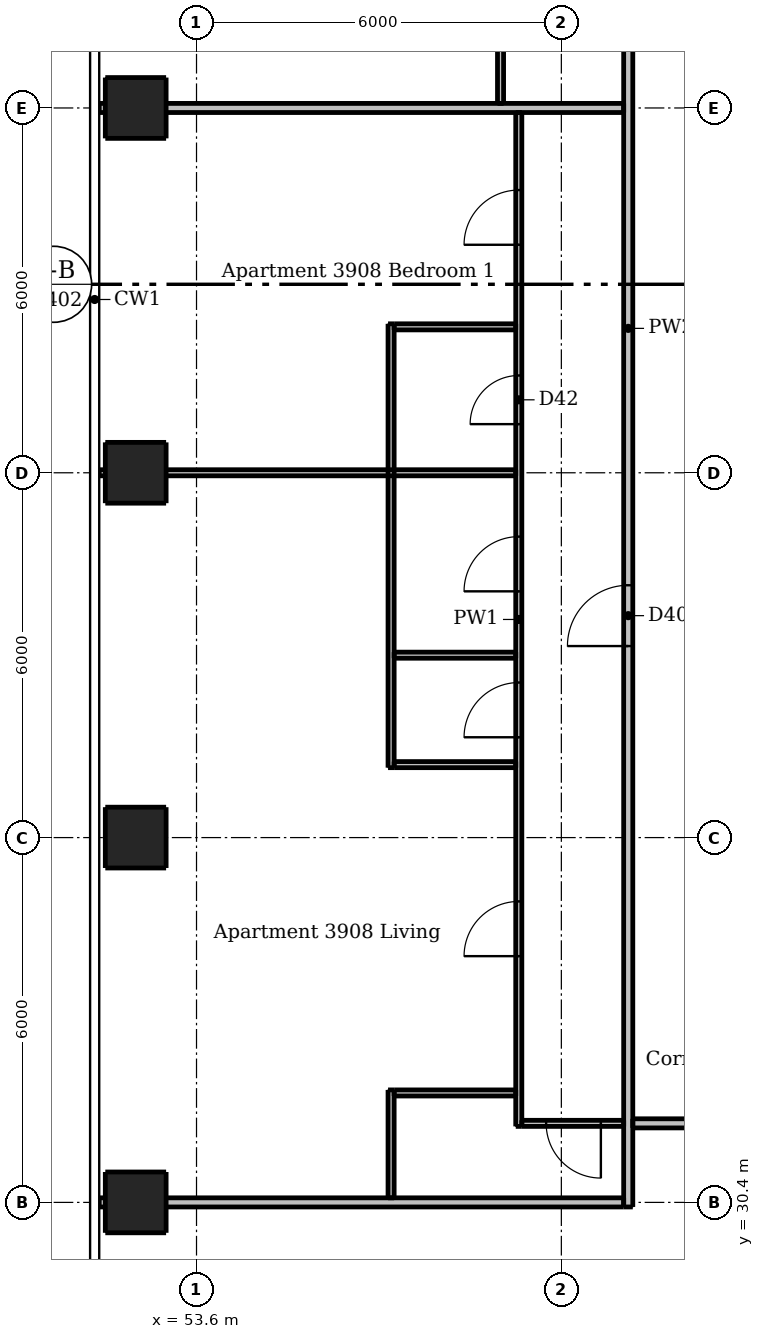
"""IFC4 building model, lengths in metres.
Left out: names, types, materials, properties, quantities, classifications, styles, units other than length and angle.
Written with IfcOpenShell. Run it as: python <this file> out.ifc"""

import sys

from ifc_helpers import new_model, si_unit, direction, frame, frame_2d, origin, origin_2d, place, context, subcontext, project, spatial, rectangle, extrude, element, fill, save


model = new_model("IFC4")
c1 = context("Model", 3, precision=1e-05, world=origin(), true_north=direction((0.0, 1.0)))
c2 = subcontext(c1, "Body", "Model", "MODEL_VIEW")
j1 = project(units=[si_unit("LENGTHUNIT", "METRE"), si_unit("PLANEANGLEUNIT", "RADIAN")], contexts=[c1])
p1 = place(None, origin())
s1 = spatial("IfcSite", under=j1, at=p1, CompositionType="ELEMENT")
p2 = place(p1, origin())
s2 = spatial("IfcBuilding", under=s1, at=p2, CompositionType="ELEMENT")
p3 = place(p2, frame((0.0, 0.0, 147.1)))
s3 = spatial("IfcBuildingStorey", under=s2, at=p3, CompositionType="ELEMENT", Elevation=147.1)
for number, where, z_axis, x_axis in (
    (1, (52.6, 30.4, 0.0), (0.0, 0.0, 1.0), (1.0, 0.0, 0.0)),
    (2, (52.6, 36.4, 0.0), (0.0, 0.0, 1.0), (1.0, 0.0, 0.0)),
    (3, (52.6, 42.4, 0.0), (0.0, 0.0, 1.0), (1.0, 0.0, 0.0)),
    (4, (52.6, 48.4, 0.0), (0.0, 0.0, 1.0), (1.0, 0.0, 0.0)),
):
    element("IfcColumn", number, at=place(p3, frame(where, z_axis=z_axis, x_axis=x_axis)), inside=s3, PredefinedType="COLUMN", context=c2, shape_type="SweptSolid", body=[
        extrude(rectangle(XDim=1.0, YDim=1.0, at=origin_2d()), origin(), (0.0, 0.0, 1.0), 3.0),
    ])
p4 = place(p3, frame((56.8, 30.475, 0.0), z_axis=(0.0, 0.0, 1.0), x_axis=(0.0, 1.0, 0.0)))
e5 = element("IfcWall", 5, at=p4, inside=s3, PredefinedType="PARTITIONING", context=c2, shape_type="SweptSolid", body=[
    extrude(rectangle(XDim=1.775, YDim=0.1, at=frame_2d((0.887, 0.0))), origin(), (0.0, 0.0, 1.0), 3.0),
])
p5 = place(p3, frame((56.8, 37.55, 0.0), z_axis=(0.0, 0.0, 1.0), x_axis=(0.0, 1.0, 0.0)))
e6 = element("IfcWall", 6, at=p5, inside=s3, PredefinedType="PARTITIONING", context=c2, shape_type="SweptSolid", body=[
    extrude(rectangle(XDim=7.3, YDim=0.1, at=frame_2d((3.65, 0.0))), origin(), (0.0, 0.0, 1.0), 3.0),
])
p6 = place(p3, frame((58.6, 54.35, 0.0), z_axis=(0.0, 0.0, 1.0), x_axis=(0.0, -1.0, 0.0)))
e7 = element("IfcWall", 7, at=p6, inside=s3, PredefinedType="PARTITIONING", context=c2, shape_type="SweptSolid", body=[
    extrude(rectangle(XDim=5.875, YDim=0.1, at=frame_2d((2.938, 0.0))), origin(), (0.0, 0.0, 1.0), 3.0),
])
p7 = place(p6, frame((3.75, 0.0, 0.0)))
e8 = element("IfcOpeningElement", 8, at=p7, cuts=e7, PredefinedType="OPENING", context=c2, shape_type="SweptSolid", body=[
    extrude(rectangle(XDim=0.8, YDim=2.1, at=frame_2d((0.4, 1.05))), frame((0.0, 0.06, 0.0), z_axis=(0.0, -1.0, 0.0), x_axis=(1.0, 0.0, 0.0)), (0.0, 0.0, 1.0), 0.12),
])
p8 = place(p3, frame((58.9, 31.65, 0.0), z_axis=(0.0, 0.0, 1.0), x_axis=(0.0, 1.0, 0.0)))
e9 = element("IfcWall", 9, at=p8, inside=s3, PredefinedType="PARTITIONING", context=c2, shape_type="SweptSolid", body=[
    extrude(rectangle(XDim=16.675, YDim=0.1, at=frame_2d((8.337, 0.0))), origin(), (0.0, 0.0, 1.0), 3.0),
])
p9 = place(p8, frame((2.8, 0.0, 0.0)))
e10 = element("IfcOpeningElement", 10, at=p9, cuts=e9, PredefinedType="OPENING", context=c2, shape_type="SweptSolid", body=[
    extrude(rectangle(XDim=0.9, YDim=2.1, at=frame_2d((0.45, 1.05))), frame((0.0, 0.06, 0.0), z_axis=(0.0, -1.0, 0.0), x_axis=(1.0, 0.0, 0.0)), (0.0, 0.0, 1.0), 0.12),
])
p10 = place(p8, frame((8.8, 0.0, 0.0)))
e11 = element("IfcOpeningElement", 11, at=p10, cuts=e9, PredefinedType="OPENING", context=c2, shape_type="SweptSolid", body=[
    extrude(rectangle(XDim=0.9, YDim=2.1, at=frame_2d((0.45, 1.05))), frame((0.0, 0.06, 0.0), z_axis=(0.0, -1.0, 0.0), x_axis=(1.0, 0.0, 0.0)), (0.0, 0.0, 1.0), 0.12),
])
p11 = place(p8, frame((6.4, 0.0, 0.0)))
e12 = element("IfcOpeningElement", 12, at=p11, cuts=e9, PredefinedType="OPENING", context=c2, shape_type="SweptSolid", body=[
    extrude(rectangle(XDim=0.9, YDim=2.1, at=frame_2d((0.45, 1.05))), frame((0.0, 0.06, 0.0), z_axis=(0.0, -1.0, 0.0), x_axis=(1.0, 0.0, 0.0)), (0.0, 0.0, 1.0), 0.12),
])
p12 = place(p8, frame((14.5, 0.0, 0.0)))
e13 = element("IfcOpeningElement", 13, at=p12, cuts=e9, PredefinedType="OPENING", context=c2, shape_type="SweptSolid", body=[
    extrude(rectangle(XDim=0.9, YDim=2.1, at=frame_2d((0.45, 1.05))), frame((0.0, 0.06, 0.0), z_axis=(0.0, -1.0, 0.0), x_axis=(1.0, 0.0, 0.0)), (0.0, 0.0, 1.0), 0.12),
])
p13 = place(p8, frame((11.55, 0.0, 0.0)))
e14 = element("IfcOpeningElement", 14, at=p13, cuts=e9, PredefinedType="OPENING", context=c2, shape_type="SweptSolid", body=[
    extrude(rectangle(XDim=0.8, YDim=2.1, at=frame_2d((0.4, 1.05))), frame((0.0, 0.06, 0.0), z_axis=(0.0, -1.0, 0.0), x_axis=(1.0, 0.0, 0.0)), (0.0, 0.0, 1.0), 0.12),
])
p14 = place(p3, frame((56.85, 44.8, 0.0), z_axis=(0.0, 0.0, 1.0), x_axis=(1.0, 0.0, 0.0)))
e15 = element("IfcWall", 15, at=p14, inside=s3, PredefinedType="PARTITIONING", context=c2, shape_type="SweptSolid", body=[
    extrude(rectangle(XDim=2.0, YDim=0.1, at=frame_2d((1.0, 0.0))), origin(), (0.0, 0.0, 1.0), 3.0),
])
p15 = place(p3, frame((52.0, 42.4, 0.0), z_axis=(0.0, 0.0, 1.0), x_axis=(1.0, 0.0, 0.0)))
e16 = element("IfcWall", 16, at=p15, inside=s3, PredefinedType="PARTITIONING", context=c2, shape_type="SweptSolid", body=[
    extrude(rectangle(XDim=6.85, YDim=0.1, at=frame_2d((3.425, 0.0))), origin(), (0.0, 0.0, 1.0), 2.466),
])
for number, where, z_axis, x_axis in (
    (17, (56.85, 39.4, 0.0), (0.0, 0.0, 1.0), (1.0, 0.0, 0.0)),
    (18, (56.85, 37.6, 0.0), (0.0, 0.0, 1.0), (1.0, 0.0, 0.0)),
    (19, (56.85, 32.2, 0.0), (0.0, 0.0, 1.0), (1.0, 0.0, 0.0)),
):
    element("IfcWall", number, at=place(p3, frame(where, z_axis=z_axis, x_axis=x_axis)), inside=s3, PredefinedType="PARTITIONING", context=c2, shape_type="SweptSolid", body=[
        extrude(rectangle(XDim=2.0, YDim=0.1, at=frame_2d((1.0, 0.0))), origin(), (0.0, 0.0, 1.0), 3.0),
    ])
p16 = place(p3, frame((60.625, 31.7, 0.0), z_axis=(0.0, 0.0, 1.0), x_axis=(-1.0, 0.0, 0.0)))
e20 = element("IfcWall", 20, at=p16, inside=s3, PredefinedType="PARTITIONING", context=c2, shape_type="SweptSolid", body=[
    extrude(rectangle(XDim=1.675, YDim=0.1, at=frame_2d((0.837, 0.0))), origin(), (0.0, 0.0, 1.0), 3.0),
])
p17 = place(p16, frame((0.375, 0.0, 0.0)))
e21 = element("IfcOpeningElement", 21, at=p17, cuts=e20, PredefinedType="OPENING", context=c2, shape_type="SweptSolid", body=[
    extrude(rectangle(XDim=0.9, YDim=2.1, at=frame_2d((0.45, 1.05))), frame((0.0, 0.06, 0.0), z_axis=(0.0, -1.0, 0.0), x_axis=(1.0, 0.0, 0.0)), (0.0, 0.0, 1.0), 0.12),
])
p18 = place(p3, frame((60.7, 30.325, 0.0), z_axis=(0.0, 0.0, 1.0), x_axis=(0.0, 1.0, 0.0)))
e22 = element("IfcWall", 22, at=p18, inside=s3, PredefinedType="PARTITIONING", context=c2, shape_type="SweptSolid", body=[
    extrude(rectangle(XDim=28.9, YDim=0.15, at=frame_2d((14.45, 0.0))), origin(), (0.0, 0.0, 1.0), 3.0),
])
p19 = place(p18, frame((9.225, 0.0, 0.0)))
e23 = element("IfcOpeningElement", 23, at=p19, cuts=e22, PredefinedType="OPENING", context=c2, shape_type="SweptSolid", body=[
    extrude(rectangle(XDim=1.0, YDim=2.1, at=frame_2d((0.5, 1.05))), frame((0.0, 0.085, 0.0), z_axis=(0.0, -1.0, 0.0), x_axis=(1.0, 0.0, 0.0)), (0.0, 0.0, 1.0), 0.17),
])
p20 = place(p18, frame((26.025, 0.0, 0.0)))
e24 = element("IfcOpeningElement", 24, at=p20, cuts=e22, PredefinedType="OPENING", context=c2, shape_type="SweptSolid", body=[
    extrude(rectangle(XDim=1.0, YDim=2.1, at=frame_2d((0.5, 1.05))), frame((0.0, 0.085, 0.0), z_axis=(0.0, -1.0, 0.0), x_axis=(1.0, 0.0, 0.0)), (0.0, 0.0, 1.0), 0.17),
])
p21 = place(p3, frame((52.0, 48.4, 0.0), z_axis=(0.0, 0.0, 1.0), x_axis=(1.0, 0.0, 0.0)))
e25 = element("IfcWall", 25, at=p21, inside=s3, PredefinedType="PARTITIONING", context=c2, shape_type="SweptSolid", body=[
    extrude(rectangle(XDim=8.625, YDim=0.15, at=frame_2d((4.312, 0.0))), origin(), (0.0, 0.0, 1.0), 2.466),
])
p22 = place(p3, frame((89.525, 31.7, 0.0), z_axis=(0.0, 0.0, 1.0), x_axis=(-1.0, 0.0, 0.0)))
e26 = element("IfcWall", 26, at=p22, inside=s3, PredefinedType="PARTITIONING", context=c2, shape_type="SweptSolid", body=[
    extrude(rectangle(XDim=28.75, YDim=0.15, at=frame_2d((14.375, 0.0))), origin(), (0.0, 0.0, 1.0), 3.0),
])
p23 = place(p22, frame((25.875, 0.0, 0.0)))
e27 = element("IfcOpeningElement", 27, at=p23, cuts=e26, PredefinedType="OPENING", context=c2, shape_type="SweptSolid", body=[
    extrude(rectangle(XDim=1.0, YDim=2.1, at=frame_2d((0.5, 1.05))), frame((0.0, 0.085, 0.0), z_axis=(0.0, -1.0, 0.0), x_axis=(1.0, 0.0, 0.0)), (0.0, 0.0, 1.0), 0.17),
])
p24 = place(p22, frame((9.925, 0.0, 0.0)))
e28 = element("IfcOpeningElement", 28, at=p24, cuts=e26, PredefinedType="OPENING", context=c2, shape_type="SweptSolid", body=[
    extrude(rectangle(XDim=1.0, YDim=2.1, at=frame_2d((0.5, 1.05))), frame((0.0, 0.085, 0.0), z_axis=(0.0, -1.0, 0.0), x_axis=(1.0, 0.0, 0.0)), (0.0, 0.0, 1.0), 0.17),
])
p25 = place(p3, frame((52.0, 30.4, 0.0), z_axis=(0.0, 0.0, 1.0), x_axis=(1.0, 0.0, 0.0)))
e29 = element("IfcWall", 29, at=p25, inside=s3, PredefinedType="PARTITIONING", context=c2, shape_type="SweptSolid", body=[
    extrude(rectangle(XDim=8.625, YDim=0.15, at=frame_2d((4.312, 0.0))), origin(), (0.0, 0.0, 1.0), 2.597),
])
p26 = place(p19, origin())
e30 = element("IfcDoor", 30, at=p26, inside=s3, OperationType="SINGLE_SWING_LEFT", PredefinedType="DOOR", context=c2, shape_type="SweptSolid", body=[
    extrude(rectangle(XDim=1.0, YDim=2.1, at=frame_2d((0.5, 1.05))), frame((0.0, 0.025, 0.0), z_axis=(0.0, -1.0, 0.0), x_axis=(1.0, 0.0, 0.0)), (0.0, 0.0, 1.0), 0.05),
])
fill(e23, e30)
p27 = place(p9, origin())
e31 = element("IfcDoor", 31, at=p27, inside=s3, OperationType="SINGLE_SWING_LEFT", PredefinedType="DOOR", context=c2, shape_type="SweptSolid", body=[
    extrude(rectangle(XDim=0.9, YDim=2.1, at=frame_2d((0.45, 1.05))), frame((0.0, 0.025, 0.0), z_axis=(0.0, -1.0, 0.0), x_axis=(1.0, 0.0, 0.0)), (0.0, 0.0, 1.0), 0.05),
])
fill(e10, e31)
p28 = place(p10, origin())
e32 = element("IfcDoor", 32, at=p28, inside=s3, OperationType="SINGLE_SWING_LEFT", PredefinedType="DOOR", context=c2, shape_type="SweptSolid", body=[
    extrude(rectangle(XDim=0.9, YDim=2.1, at=frame_2d((0.45, 1.05))), frame((0.0, 0.025, 0.0), z_axis=(0.0, -1.0, 0.0), x_axis=(1.0, 0.0, 0.0)), (0.0, 0.0, 1.0), 0.05),
])
fill(e11, e32)
p29 = place(p11, origin())
e33 = element("IfcDoor", 33, at=p29, inside=s3, OperationType="SINGLE_SWING_LEFT", PredefinedType="DOOR", context=c2, shape_type="SweptSolid", body=[
    extrude(rectangle(XDim=0.9, YDim=2.1, at=frame_2d((0.45, 1.05))), frame((0.0, 0.025, 0.0), z_axis=(0.0, -1.0, 0.0), x_axis=(1.0, 0.0, 0.0)), (0.0, 0.0, 1.0), 0.05),
])
fill(e12, e33)
p30 = place(p17, origin())
e34 = element("IfcDoor", 34, at=p30, inside=s3, OperationType="SINGLE_SWING_LEFT", PredefinedType="DOOR", context=c2, shape_type="SweptSolid", body=[
    extrude(rectangle(XDim=0.9, YDim=2.1, at=frame_2d((0.45, 1.05))), frame((0.0, 0.025, 0.0), z_axis=(0.0, -1.0, 0.0), x_axis=(1.0, 0.0, 0.0)), (0.0, 0.0, 1.0), 0.05),
])
fill(e21, e34)
p31 = place(p12, origin())
e35 = element("IfcDoor", 35, at=p31, inside=s3, OperationType="SINGLE_SWING_LEFT", PredefinedType="DOOR", context=c2, shape_type="SweptSolid", body=[
    extrude(rectangle(XDim=0.9, YDim=2.1, at=frame_2d((0.45, 1.05))), frame((0.0, 0.025, 0.0), z_axis=(0.0, -1.0, 0.0), x_axis=(1.0, 0.0, 0.0)), (0.0, 0.0, 1.0), 0.05),
])
fill(e13, e35)
p32 = place(p13, origin())
e36 = element("IfcDoor", 36, at=p32, inside=s3, OperationType="SINGLE_SWING_LEFT", PredefinedType="DOOR", context=c2, shape_type="SweptSolid", body=[
    extrude(rectangle(XDim=0.8, YDim=2.1, at=frame_2d((0.4, 1.05))), frame((0.0, 0.025, 0.0), z_axis=(0.0, -1.0, 0.0), x_axis=(1.0, 0.0, 0.0)), (0.0, 0.0, 1.0), 0.05),
])
fill(e14, e36)
save(model, sys.argv[1])
